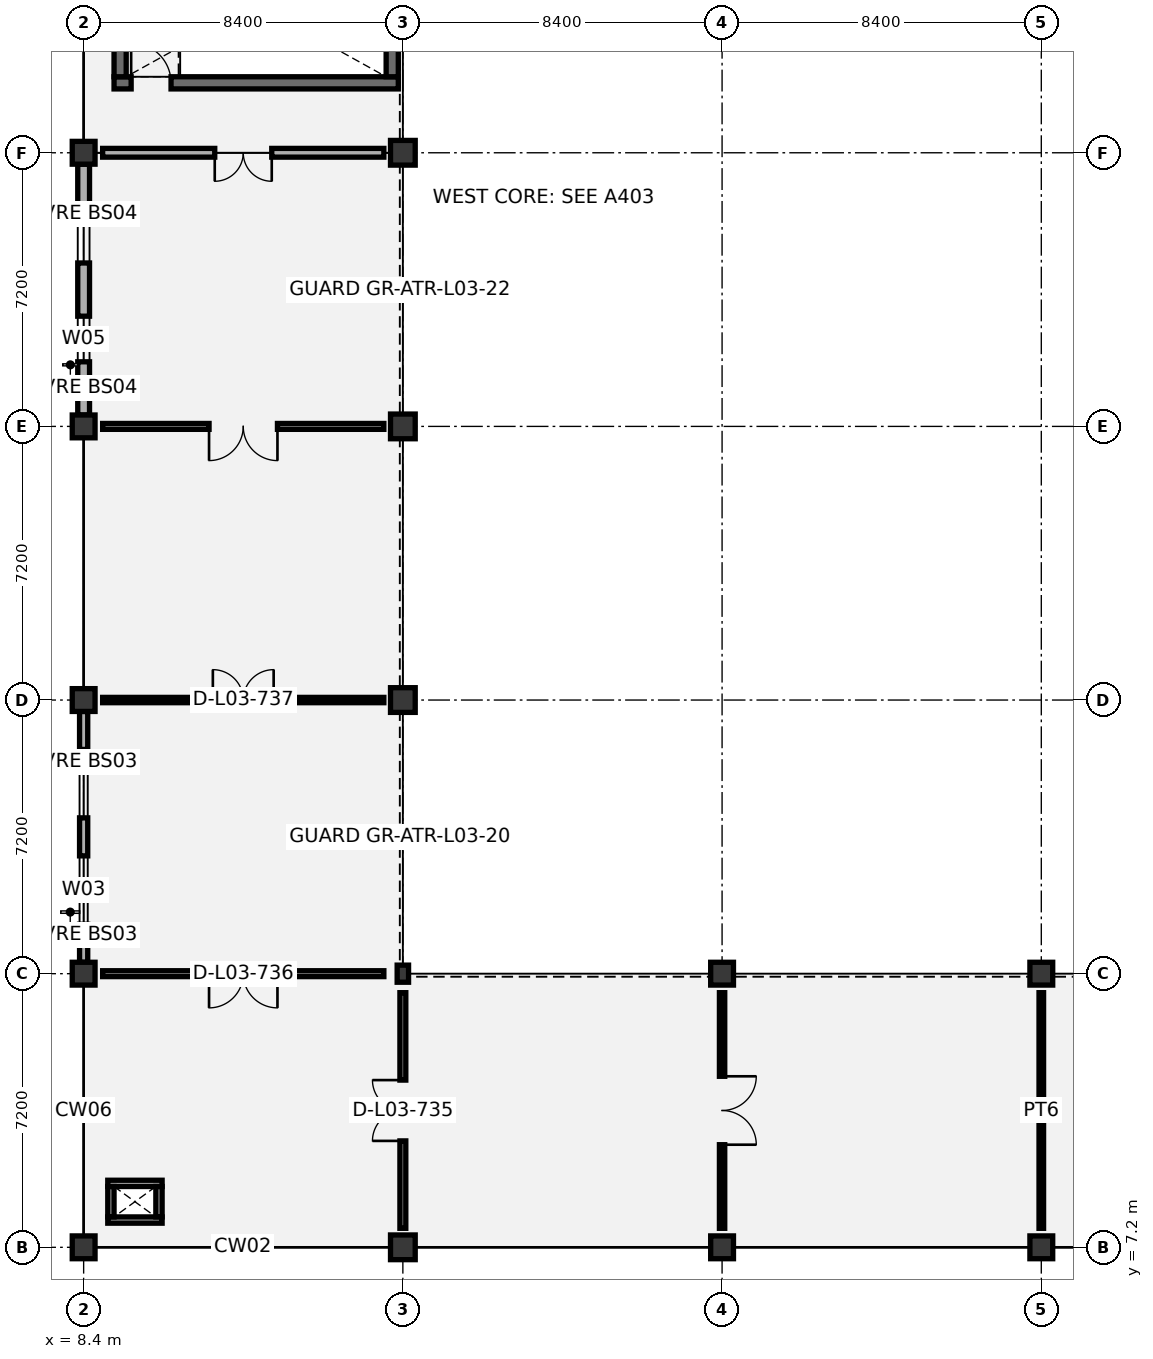
"""IFC4 building model, lengths in metres.
Left out: names, types, materials, properties, quantities, classifications, styles, units other than length and angle.
Written with IfcOpenShell. Run it as: python <this file> out.ifc"""

import sys

from ifc_helpers import new_model, si_unit, direction, frame, frame_2d, origin, origin_2d, place, context, subcontext, project, spatial, rectangle, i_section, extrude, element, fill, save


model = new_model("IFC4")
c1 = context("Model", 3, precision=1e-05, world=origin(), true_north=direction((0.0, 1.0)))
c2 = subcontext(c1, "Body", "Model", "MODEL_VIEW")
j1 = project(units=[si_unit("LENGTHUNIT", "METRE"), si_unit("PLANEANGLEUNIT", "RADIAN")], contexts=[c1])
p1 = place(None, origin())
s1 = spatial("IfcSite", under=j1, at=p1, CompositionType="ELEMENT")
p2 = place(p1, origin())
s2 = spatial("IfcBuilding", under=s1, at=p2, CompositionType="ELEMENT")
p3 = place(p2, frame((0.0, 0.0, 16.8)))
s3 = spatial("IfcBuildingStorey", under=s2, at=p3, CompositionType="ELEMENT", Elevation=16.8)
for number, where, z_axis, x_axis in (
    (1, (8.4, 7.2, 0.0), (0.0, 0.0, 1.0), (1.0, 0.0, 0.0)),
    (2, (8.4, 14.4, 0.0), (0.0, 0.0, 1.0), (1.0, 0.0, 0.0)),
    (3, (8.4, 21.6, 0.0), (0.0, 0.0, 1.0), (1.0, 0.0, 0.0)),
    (4, (8.4, 28.8, 0.0), (0.0, 0.0, 1.0), (1.0, 0.0, 0.0)),
    (5, (8.4, 36.0, 0.0), (0.0, 0.0, 1.0), (1.0, 0.0, 0.0)),
):
    element("IfcColumn", number, at=place(p3, frame(where, z_axis=z_axis, x_axis=x_axis)), inside=s3, PredefinedType="COLUMN", context=c2, shape_type="SweptSolid", body=[
        extrude(rectangle(XDim=0.6, YDim=0.6, at=origin_2d()), origin(), (0.0, 0.0, 1.0), 5.05),
    ])
p4 = place(p3, frame((16.8, 7.2, 0.0), z_axis=(0.0, 0.0, 1.0), x_axis=(1.0, 0.0, 0.0)))
e6 = element("IfcColumn", 6, at=p4, inside=s3, PredefinedType="COLUMN", context=c2, shape_type="SweptSolid", body=[
    extrude(rectangle(XDim=0.65, YDim=0.65, at=origin_2d()), origin(), (0.0, 0.0, 1.0), 5.4),
])
p5 = place(p3, frame((16.8, 14.4, 0.0), z_axis=(0.0, 0.0, 1.0), x_axis=(1.0, 0.0, 0.0)))
e7 = element("IfcColumn", 7, at=p5, inside=s3, PredefinedType="COLUMN", context=c2, shape_type="SweptSolid", body=[
    extrude(i_section(OverallWidth=0.3, OverallDepth=0.45, WebThickness=0.014, FlangeThickness=0.026, FilletRadius=0.027, at=origin_2d()), origin(), (0.0, 0.0, 1.0), 5.4),
])
for number, where, z_axis, x_axis in (
    (8, (16.8, 21.6, 0.0), (0.0, 0.0, 1.0), (1.0, 0.0, 0.0)),
    (9, (16.8, 28.8, 0.0), (0.0, 0.0, 1.0), (1.0, 0.0, 0.0)),
    (10, (16.8, 36.0, 0.0), (0.0, 0.0, 1.0), (1.0, 0.0, 0.0)),
):
    element("IfcColumn", number, at=place(p3, frame(where, z_axis=z_axis, x_axis=x_axis)), inside=s3, PredefinedType="COLUMN", context=c2, shape_type="SweptSolid", body=[
        extrude(rectangle(XDim=0.65, YDim=0.65, at=origin_2d()), origin(), (0.0, 0.0, 1.0), 5.4),
    ])
for number, where, z_axis, x_axis in (
    (11, (25.2, 7.2, 0.0), (0.0, 0.0, 1.0), (1.0, 0.0, 0.0)),
    (12, (25.2, 14.4, 0.0), (0.0, 0.0, 1.0), (1.0, 0.0, 0.0)),
    (13, (33.6, 7.2, 0.0), (0.0, 0.0, 1.0), (1.0, 0.0, 0.0)),
    (14, (33.6, 14.4, 0.0), (0.0, 0.0, 1.0), (1.0, 0.0, 0.0)),
):
    element("IfcColumn", number, at=place(p3, frame(where, z_axis=z_axis, x_axis=x_axis)), inside=s3, PredefinedType="COLUMN", context=c2, shape_type="SweptSolid", body=[
        extrude(rectangle(XDim=0.6, YDim=0.6, at=origin_2d()), origin(), (0.0, 0.0, 1.0), 5.05),
    ])
p6 = place(p3, frame((9.2, 37.84, 0.0), z_axis=(0.0, 0.0, 1.0), x_axis=(1.0, 0.0, 0.0)))
e15 = element("IfcWall", 15, at=p6, inside=s3, PredefinedType="SHEAR", context=c2, shape_type="SweptSolid", body=[
    extrude(rectangle(XDim=7.48, YDim=0.32, at=frame_2d((3.74, 0.0))), origin(), (0.0, 0.0, 1.0), 4.825),
])
p7 = place(p6, frame((0.45, 0.0, 0.0)))
e16 = element("IfcOpeningElement", 16, at=p7, cuts=e15, PredefinedType="OPENING", context=c2, shape_type="SweptSolid", body=[
    extrude(rectangle(XDim=1.05, YDim=2.15, at=frame_2d((0.525, 1.075))), frame((0.0, 0.17, 0.0), z_axis=(0.0, -1.0, 0.0), x_axis=(1.0, 0.0, 0.0)), (0.0, 0.0, 1.0), 0.34),
])
for number, where, z_axis, x_axis in (
    (17, (9.36, 38.0, 0.0), (0.0, 0.0, 1.0), (0.0, 1.0, 0.0)),
    (18, (16.52, 38.0, 0.0), (0.0, 0.0, 1.0), (0.0, 1.0, 0.0)),
):
    element("IfcWall", number, at=place(p3, frame(where, z_axis=z_axis, x_axis=x_axis)), inside=s3, PredefinedType="SHEAR", context=c2, shape_type="SweptSolid", body=[
        extrude(rectangle(XDim=3.8, YDim=0.32, at=frame_2d((1.9, 0.0))), origin(), (0.0, 0.0, 1.0), 4.825),
    ])
p8 = place(p3, frame((8.4, 14.7, 0.0), z_axis=(0.0, 0.0, 1.0), x_axis=(0.0, 1.0, 0.0)))
e19 = element("IfcWall", 19, at=p8, inside=s3, PredefinedType="SOLIDWALL", context=c2, shape_type="SweptSolid", body=[
    extrude(rectangle(XDim=6.6, YDim=0.215, at=frame_2d((3.3, 0.0))), origin(), (0.0, 0.0, 1.0), 4.17),
])
p9 = place(p8, frame((1.0, 0.0, 0.9)))
e20 = element("IfcOpeningElement", 20, at=p9, cuts=e19, PredefinedType="OPENING", context=c2, shape_type="SweptSolid", body=[
    extrude(rectangle(XDim=1.8, YDim=1.8, at=frame_2d((0.9, 0.9))), frame((0.0, 0.117, 0.0), z_axis=(0.0, -1.0, 0.0), x_axis=(1.0, 0.0, 0.0)), (0.0, 0.0, 1.0), 0.235),
])
p10 = place(p8, frame((3.8, 0.0, 0.9)))
e21 = element("IfcOpeningElement", 21, at=p10, cuts=e19, PredefinedType="OPENING", context=c2, shape_type="SweptSolid", body=[
    extrude(rectangle(XDim=1.8, YDim=1.8, at=frame_2d((0.9, 0.9))), frame((0.0, 0.117, 0.0), z_axis=(0.0, -1.0, 0.0), x_axis=(1.0, 0.0, 0.0)), (0.0, 0.0, 1.0), 0.235),
])
p11 = place(p3, frame((8.4, 29.1, 0.0), z_axis=(0.0, 0.0, 1.0), x_axis=(0.0, 1.0, 0.0)))
e22 = element("IfcWall", 22, at=p11, inside=s3, PredefinedType="SOLIDWALL", context=c2, shape_type="SweptSolid", body=[
    extrude(rectangle(XDim=6.6, YDim=0.31, at=frame_2d((3.3, 0.0))), origin(), (0.0, 0.0, 1.0), 4.17),
])
p12 = place(p11, frame((1.4, 0.0, 0.9)))
e23 = element("IfcOpeningElement", 23, at=p12, cuts=e22, PredefinedType="OPENING", context=c2, shape_type="SweptSolid", body=[
    extrude(rectangle(XDim=1.2, YDim=1.8, at=frame_2d((0.6, 0.9))), frame((0.0, 0.165, 0.0), z_axis=(0.0, -1.0, 0.0), x_axis=(1.0, 0.0, 0.0)), (0.0, 0.0, 1.0), 0.33),
])
p13 = place(p11, frame((4.0, 0.0, 0.9)))
e24 = element("IfcOpeningElement", 24, at=p13, cuts=e22, PredefinedType="OPENING", context=c2, shape_type="SweptSolid", body=[
    extrude(rectangle(XDim=1.2, YDim=1.8, at=frame_2d((0.6, 0.9))), frame((0.0, 0.165, 0.0), z_axis=(0.0, -1.0, 0.0), x_axis=(1.0, 0.0, 0.0)), (0.0, 0.0, 1.0), 0.33),
])
p14 = place(p3, frame((8.4, 0.12, 0.0), z_axis=(0.0, 0.0, 1.0), x_axis=(0.0, 1.0, 0.0)))
e25 = element("IfcWall", 25, at=p14, inside=s3, PredefinedType="PARAPET", context=c2, shape_type="SweptSolid", body=[
    extrude(rectangle(XDim=6.96, YDim=0.22, at=frame_2d((3.48, 0.0))), origin(), (0.0, 0.0, 1.0), 1.15),
])
for number, where, z_axis, x_axis in (
    (26, (9.035, 7.917, 0.0), (0.0, 0.0, 1.0), (1.0, 0.0, 0.0)),
    (27, (9.035, 8.883, 0.0), (0.0, 0.0, 1.0), (1.0, 0.0, 0.0)),
):
    element("IfcWall", number, at=place(p3, frame(where, z_axis=z_axis, x_axis=x_axis)), inside=s3, PredefinedType="PARTITIONING", context=c2, shape_type="SweptSolid", body=[
        extrude(rectangle(XDim=1.43, YDim=0.165, at=frame_2d((0.715, 0.0))), origin(), (0.0, 0.0, 1.0), 4.825),
    ])
for number, where, z_axis, x_axis in (
    (28, (9.117, 8.0, 0.0), (0.0, 0.0, 1.0), (0.0, 1.0, 0.0)),
    (29, (10.383, 8.0, 0.0), (0.0, 0.0, 1.0), (0.0, 1.0, 0.0)),
):
    element("IfcWall", number, at=place(p3, frame(where, z_axis=z_axis, x_axis=x_axis)), inside=s3, PredefinedType="PARTITIONING", context=c2, shape_type="SweptSolid", body=[
        extrude(rectangle(XDim=0.8, YDim=0.165, at=frame_2d((0.4, 0.0))), origin(), (0.0, 0.0, 1.0), 4.825),
    ])
p15 = place(p3, frame((16.8, 7.7, 0.0), z_axis=(0.0, 0.0, 1.0), x_axis=(0.0, 1.0, 0.0)))
e30 = element("IfcWall", 30, at=p15, inside=s3, PredefinedType="PARTITIONING", context=c2, shape_type="SweptSolid", body=[
    extrude(rectangle(XDim=6.2, YDim=0.155, at=frame_2d((3.1, 0.0))), origin(), (0.0, 0.0, 1.0), 4.42),
])
p16 = place(p15, frame((2.3, 0.0, 0.0)))
e31 = element("IfcOpeningElement", 31, at=p16, cuts=e30, PredefinedType="OPENING", context=c2, shape_type="SweptSolid", body=[
    extrude(rectangle(XDim=1.6, YDim=2.2, at=frame_2d((0.8, 1.1))), frame((0.0, 0.087, 0.0), z_axis=(0.0, -1.0, 0.0), x_axis=(1.0, 0.0, 0.0)), (0.0, 0.0, 1.0), 0.175),
])
p17 = place(p3, frame((8.9, 14.4, 0.0), z_axis=(0.0, 0.0, 1.0), x_axis=(1.0, 0.0, 0.0)))
e32 = element("IfcWall", 32, at=p17, inside=s3, PredefinedType="PARTITIONING", context=c2, shape_type="SweptSolid", body=[
    extrude(rectangle(XDim=7.4, YDim=0.155, at=frame_2d((3.7, 0.0))), origin(), (0.0, 0.0, 1.0), 4.07),
])
p18 = place(p17, frame((2.8, 0.0, 0.0)))
e33 = element("IfcOpeningElement", 33, at=p18, cuts=e32, PredefinedType="OPENING", context=c2, shape_type="SweptSolid", body=[
    extrude(rectangle(XDim=1.8, YDim=2.25, at=frame_2d((0.9, 1.125))), frame((0.0, 0.087, 0.0), z_axis=(0.0, -1.0, 0.0), x_axis=(1.0, 0.0, 0.0)), (0.0, 0.0, 1.0), 0.175),
])
p19 = place(p3, frame((8.9, 21.6, 0.0), z_axis=(0.0, 0.0, 1.0), x_axis=(1.0, 0.0, 0.0)))
e34 = element("IfcWall", 34, at=p19, inside=s3, PredefinedType="PARTITIONING", context=c2, shape_type="SweptSolid", body=[
    extrude(rectangle(XDim=7.4, YDim=0.14, at=frame_2d((3.7, 0.0))), origin(), (0.0, 0.0, 1.0), 4.07),
])
p20 = place(p19, frame((2.9, 0.0, 0.0)))
e35 = element("IfcOpeningElement", 35, at=p20, cuts=e34, PredefinedType="OPENING", context=c2, shape_type="SweptSolid", body=[
    extrude(rectangle(XDim=1.6, YDim=2.2, at=frame_2d((0.8, 1.1))), frame((0.0, 0.08, 0.0), z_axis=(0.0, -1.0, 0.0), x_axis=(1.0, 0.0, 0.0)), (0.0, 0.0, 1.0), 0.16),
])
p21 = place(p3, frame((8.9, 28.8, 0.0), z_axis=(0.0, 0.0, 1.0), x_axis=(1.0, 0.0, 0.0)))
e36 = element("IfcWall", 36, at=p21, inside=s3, PredefinedType="PARTITIONING", context=c2, shape_type="SweptSolid", body=[
    extrude(rectangle(XDim=7.4, YDim=0.155, at=frame_2d((3.7, 0.0))), origin(), (0.0, 0.0, 1.0), 4.07),
])
p22 = place(p21, frame((2.8, 0.0, 0.0)))
e37 = element("IfcOpeningElement", 37, at=p22, cuts=e36, PredefinedType="OPENING", context=c2, shape_type="SweptSolid", body=[
    extrude(rectangle(XDim=1.8, YDim=2.25, at=frame_2d((0.9, 1.125))), frame((0.0, 0.087, 0.0), z_axis=(0.0, -1.0, 0.0), x_axis=(1.0, 0.0, 0.0)), (0.0, 0.0, 1.0), 0.175),
])
p23 = place(p3, frame((8.9, 36.0, 0.0), z_axis=(0.0, 0.0, 1.0), x_axis=(1.0, 0.0, 0.0)))
e38 = element("IfcWall", 38, at=p23, inside=s3, PredefinedType="PARTITIONING", context=c2, shape_type="SweptSolid", body=[
    extrude(rectangle(XDim=7.4, YDim=0.23, at=frame_2d((3.7, 0.0))), origin(), (0.0, 0.0, 1.0), 4.07),
])
p24 = place(p23, frame((2.95, 0.0, 0.0)))
e39 = element("IfcOpeningElement", 39, at=p24, cuts=e38, PredefinedType="OPENING", context=c2, shape_type="SweptSolid", body=[
    extrude(rectangle(XDim=1.5, YDim=2.15, at=frame_2d((0.75, 1.075))), frame((0.0, 0.125, 0.0), z_axis=(0.0, -1.0, 0.0), x_axis=(1.0, 0.0, 0.0)), (0.0, 0.0, 1.0), 0.25),
])
p25 = place(p3, frame((25.2, 7.7, 0.0), z_axis=(0.0, 0.0, 1.0), x_axis=(0.0, 1.0, 0.0)))
e40 = element("IfcWall", 40, at=p25, inside=s3, PredefinedType="PARTITIONING", context=c2, shape_type="SweptSolid", body=[
    extrude(rectangle(XDim=6.2, YDim=0.14, at=frame_2d((3.1, 0.0))), origin(), (0.0, 0.0, 1.0), 4.12),
])
p26 = place(p25, frame((2.2, 0.0, 0.0)))
e41 = element("IfcOpeningElement", 41, at=p26, cuts=e40, PredefinedType="OPENING", context=c2, shape_type="SweptSolid", body=[
    extrude(rectangle(XDim=1.8, YDim=2.25, at=frame_2d((0.9, 1.125))), frame((0.0, 0.08, 0.0), z_axis=(0.0, -1.0, 0.0), x_axis=(1.0, 0.0, 0.0)), (0.0, 0.0, 1.0), 0.16),
])
p27 = place(p3, frame((33.6, 7.7, 0.0), z_axis=(0.0, 0.0, 1.0), x_axis=(0.0, 1.0, 0.0)))
e42 = element("IfcWall", 42, at=p27, inside=s3, PredefinedType="PARTITIONING", context=c2, shape_type="SweptSolid", body=[
    extrude(rectangle(XDim=6.2, YDim=0.12, at=frame_2d((3.1, 0.0))), origin(), (0.0, 0.0, 1.0), 4.53),
])
p28 = place(p9, origin())
e43 = element("IfcWindow", 43, at=p28, inside=s3, PartitioningType="SINGLE_PANEL", PredefinedType="WINDOW", context=c2, shape_type="SweptSolid", body=[
    extrude(rectangle(XDim=1.8, YDim=1.8, at=frame_2d((0.9, 0.9))), frame((0.0, 0.03, 0.0), z_axis=(0.0, -1.0, 0.0), x_axis=(1.0, 0.0, 0.0)), (0.0, 0.0, 1.0), 0.06),
])
fill(e20, e43)
p29 = place(p10, origin())
e44 = element("IfcWindow", 44, at=p29, inside=s3, PartitioningType="SINGLE_PANEL", PredefinedType="WINDOW", context=c2, shape_type="SweptSolid", body=[
    extrude(rectangle(XDim=1.8, YDim=1.8, at=frame_2d((0.9, 0.9))), frame((0.0, 0.03, 0.0), z_axis=(0.0, -1.0, 0.0), x_axis=(1.0, 0.0, 0.0)), (0.0, 0.0, 1.0), 0.06),
])
fill(e21, e44)
p30 = place(p12, origin())
e45 = element("IfcWindow", 45, at=p30, inside=s3, PartitioningType="SINGLE_PANEL", PredefinedType="WINDOW", context=c2, shape_type="SweptSolid", body=[
    extrude(rectangle(XDim=1.2, YDim=1.8, at=frame_2d((0.6, 0.9))), frame((0.0, 0.03, 0.0), z_axis=(0.0, -1.0, 0.0), x_axis=(1.0, 0.0, 0.0)), (0.0, 0.0, 1.0), 0.06),
])
fill(e23, e45)
p31 = place(p13, origin())
e46 = element("IfcWindow", 46, at=p31, inside=s3, PartitioningType="SINGLE_PANEL", PredefinedType="WINDOW", context=c2, shape_type="SweptSolid", body=[
    extrude(rectangle(XDim=1.2, YDim=1.8, at=frame_2d((0.6, 0.9))), frame((0.0, 0.03, 0.0), z_axis=(0.0, -1.0, 0.0), x_axis=(1.0, 0.0, 0.0)), (0.0, 0.0, 1.0), 0.06),
])
fill(e24, e46)
p32 = place(p7, origin())
e47 = element("IfcDoor", 47, at=p32, inside=s3, OperationType="SINGLE_SWING_LEFT", PredefinedType="DOOR", context=c2, shape_type="SweptSolid", body=[
    extrude(rectangle(XDim=1.05, YDim=2.15, at=frame_2d((0.525, 1.075))), frame((0.0, 0.025, 0.0), z_axis=(0.0, -1.0, 0.0), x_axis=(1.0, 0.0, 0.0)), (0.0, 0.0, 1.0), 0.05),
])
fill(e16, e47)
p33 = place(p16, origin())
e48 = element("IfcDoor", 48, at=p33, inside=s3, OperationType="DOUBLE_DOOR_SINGLE_SWING", PredefinedType="DOOR", context=c2, shape_type="SweptSolid", body=[
    extrude(rectangle(XDim=1.6, YDim=2.2, at=frame_2d((0.8, 1.1))), frame((0.0, 0.025, 0.0), z_axis=(0.0, -1.0, 0.0), x_axis=(1.0, 0.0, 0.0)), (0.0, 0.0, 1.0), 0.05),
])
fill(e31, e48)
p34 = place(p18, frame((1.8, 0.0, 0.0), z_axis=(0.0, 0.0, 1.0), x_axis=(-1.0, 0.0, 0.0)))
e49 = element("IfcDoor", 49, at=p34, inside=s3, OperationType="DOUBLE_DOOR_SINGLE_SWING", PredefinedType="DOOR", context=c2, shape_type="SweptSolid", body=[
    extrude(rectangle(XDim=1.8, YDim=2.25, at=frame_2d((0.9, 1.125))), frame((0.0, 0.025, 0.0), z_axis=(0.0, -1.0, 0.0), x_axis=(1.0, 0.0, 0.0)), (0.0, 0.0, 1.0), 0.05),
])
fill(e33, e49)
p35 = place(p20, origin())
e50 = element("IfcDoor", 50, at=p35, inside=s3, OperationType="DOUBLE_DOOR_SINGLE_SWING", PredefinedType="DOOR", context=c2, shape_type="SweptSolid", body=[
    extrude(rectangle(XDim=1.6, YDim=2.2, at=frame_2d((0.8, 1.1))), frame((0.0, 0.025, 0.0), z_axis=(0.0, -1.0, 0.0), x_axis=(1.0, 0.0, 0.0)), (0.0, 0.0, 1.0), 0.05),
])
fill(e35, e50)
p36 = place(p22, frame((1.8, 0.0, 0.0), z_axis=(0.0, 0.0, 1.0), x_axis=(-1.0, 0.0, 0.0)))
e51 = element("IfcDoor", 51, at=p36, inside=s3, OperationType="DOUBLE_DOOR_SINGLE_SWING", PredefinedType="DOOR", context=c2, shape_type="SweptSolid", body=[
    extrude(rectangle(XDim=1.8, YDim=2.25, at=frame_2d((0.9, 1.125))), frame((0.0, 0.025, 0.0), z_axis=(0.0, -1.0, 0.0), x_axis=(1.0, 0.0, 0.0)), (0.0, 0.0, 1.0), 0.05),
])
fill(e37, e51)
p37 = place(p24, frame((1.5, 0.0, 0.0), z_axis=(0.0, 0.0, 1.0), x_axis=(-1.0, 0.0, 0.0)))
e52 = element("IfcDoor", 52, at=p37, inside=s3, OperationType="DOUBLE_DOOR_SINGLE_SWING", PredefinedType="DOOR", context=c2, shape_type="SweptSolid", body=[
    extrude(rectangle(XDim=1.5, YDim=2.15, at=frame_2d((0.75, 1.075))), frame((0.0, 0.025, 0.0), z_axis=(0.0, -1.0, 0.0), x_axis=(1.0, 0.0, 0.0)), (0.0, 0.0, 1.0), 0.05),
])
fill(e39, e52)
p38 = place(p26, frame((1.8, 0.0, 0.0), z_axis=(0.0, 0.0, 1.0), x_axis=(-1.0, 0.0, 0.0)))
e53 = element("IfcDoor", 53, at=p38, inside=s3, OperationType="DOUBLE_DOOR_SINGLE_SWING", PredefinedType="DOOR", context=c2, shape_type="SweptSolid", body=[
    extrude(rectangle(XDim=1.8, YDim=2.25, at=frame_2d((0.9, 1.125))), frame((0.0, 0.025, 0.0), z_axis=(0.0, -1.0, 0.0), x_axis=(1.0, 0.0, 0.0)), (0.0, 0.0, 1.0), 0.05),
])
fill(e41, e53)
save(model, sys.argv[1])
